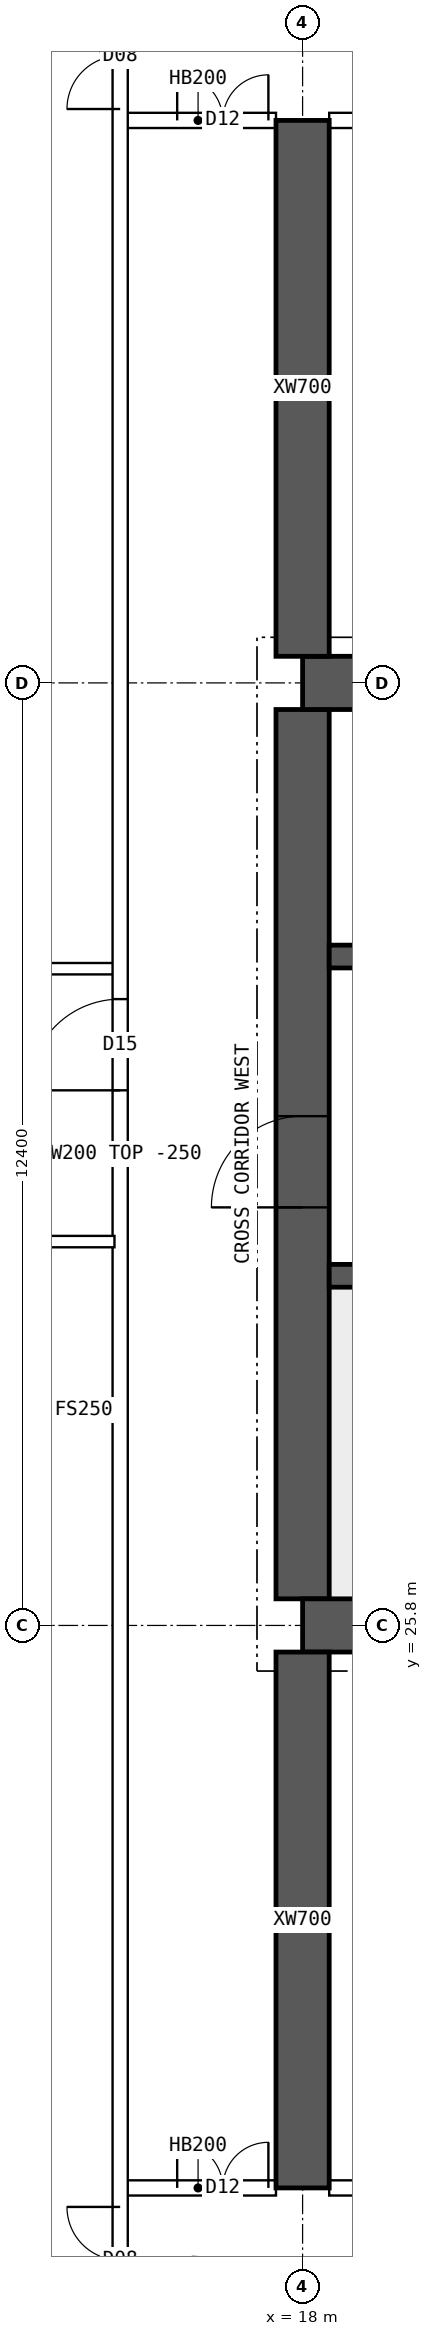
"""IFC4 building model, lengths in metres.
Left out: names, types, materials, properties, quantities, classifications, styles, units other than length and angle.
Written with IfcOpenShell. Run it as: python <this file> out.ifc"""

import sys

from ifc_helpers import new_model, si_unit, direction, frame, frame_2d, origin, place, context, subcontext, project, spatial, polyline, rectangle, outline, extrude, element, fill, save


model = new_model("IFC4")
c1 = context("Model", 3, precision=1e-05, world=origin(), true_north=direction((0.0, 1.0)))
c2 = subcontext(c1, "Body", "Model", "MODEL_VIEW")
j1 = project(units=[si_unit("LENGTHUNIT", "METRE"), si_unit("PLANEANGLEUNIT", "RADIAN")], contexts=[c1])
p1 = place(None, origin())
s1 = spatial("IfcSite", under=j1, at=p1, CompositionType="ELEMENT")
p2 = place(p1, origin())
s2 = spatial("IfcBuilding", under=s1, at=p2, CompositionType="ELEMENT")
p3 = place(p2, frame((0.0, 0.0, 239.05)))
s3 = spatial("IfcBuildingStorey", under=s2, at=p3, CompositionType="ELEMENT", Elevation=239.05)
for number, where, z_axis, x_axis in (
    (1, (18.0, 25.8, 0.0), (0.0, 0.0, 1.0), (1.0, 0.0, 0.0)),
    (2, (18.0, 38.2, 0.0), (0.0, 0.0, 1.0), (1.0, 0.0, 0.0)),
):
    element("IfcWall", number, at=place(p3, frame(where, z_axis=z_axis, x_axis=x_axis)), inside=s3, PredefinedType="SHEAR", context=c2, shape_type="SweptSolid", body=[
        extrude(rectangle(XDim=48.0, YDim=0.7, at=frame_2d((24.0, 0.0))), origin(), (0.0, 0.0, 1.0), 3.75),
    ])
p4 = place(p3, frame((18.0, 26.15, 0.0), z_axis=(0.0, 0.0, 1.0), x_axis=(0.0, 1.0, 0.0)))
e3 = element("IfcWall", 3, at=p4, inside=s3, PredefinedType="SHEAR", context=c2, shape_type="SweptSolid", body=[
    extrude(rectangle(XDim=11.7, YDim=0.7, at=frame_2d((5.85, 0.0))), origin(), (0.0, 0.0, 1.0), 3.75),
])
p5 = place(p4, frame((5.15, 0.0, 0.0)))
e4 = element("IfcOpeningElement", 4, at=p5, cuts=e3, PredefinedType="OPENING", context=c2, shape_type="SweptSolid", body=[
    extrude(rectangle(XDim=1.2, YDim=2.1, at=frame_2d((0.6, 1.05))), frame((0.0, 0.36, 0.0), z_axis=(0.0, -1.0, 0.0), x_axis=(1.0, 0.0, 0.0)), (0.0, 0.0, 1.0), 0.72),
])
p6 = place(p3, frame((18.35, 30.4, 0.0), z_axis=(0.0, 0.0, 1.0), x_axis=(1.0, 0.0, 0.0)))
e5 = element("IfcWall", 5, at=p6, inside=s3, PredefinedType="SHEAR", context=c2, shape_type="SweptSolid", body=[
    extrude(rectangle(XDim=47.3, YDim=0.3, at=frame_2d((23.65, 0.0))), origin(), (0.0, 0.0, 1.0), 3.75),
])
p7 = place(p6, frame((0.4, 0.0, 0.0)))
e6 = element("IfcOpeningElement", 6, at=p7, cuts=e5, PredefinedType="OPENING", context=c2, shape_type="SweptSolid", body=[
    extrude(rectangle(XDim=1.0, YDim=2.1, at=frame_2d((0.5, 1.05))), frame((0.0, 0.16, 0.0), z_axis=(0.0, -1.0, 0.0), x_axis=(1.0, 0.0, 0.0)), (0.0, 0.0, 1.0), 0.32),
])
p8 = place(p6, frame((45.9, 0.0, 0.0)))
e7 = element("IfcOpeningElement", 7, at=p8, cuts=e5, PredefinedType="OPENING", context=c2, shape_type="SweptSolid", body=[
    extrude(rectangle(XDim=1.0, YDim=2.1, at=frame_2d((0.5, 1.05))), frame((0.0, 0.16, 0.0), z_axis=(0.0, -1.0, 0.0), x_axis=(1.0, 0.0, 0.0)), (0.0, 0.0, 1.0), 0.32),
])
p9 = place(p6, frame((8.4, 0.0, 0.0)))
e8 = element("IfcOpeningElement", 8, at=p9, cuts=e5, PredefinedType="OPENING", context=c2, shape_type="SweptSolid", body=[
    extrude(rectangle(XDim=1.1, YDim=2.1, at=frame_2d((0.55, 1.05))), frame((0.0, 0.16, 0.0), z_axis=(0.0, -1.0, 0.0), x_axis=(1.0, 0.0, 0.0)), (0.0, 0.0, 1.0), 0.32),
])
p10 = place(p6, frame((11.0, 0.0, 0.0)))
e9 = element("IfcOpeningElement", 9, at=p10, cuts=e5, PredefinedType="OPENING", context=c2, shape_type="SweptSolid", body=[
    extrude(rectangle(XDim=1.1, YDim=2.1, at=frame_2d((0.55, 1.05))), frame((0.0, 0.16, 0.0), z_axis=(0.0, -1.0, 0.0), x_axis=(1.0, 0.0, 0.0)), (0.0, 0.0, 1.0), 0.32),
])
p11 = place(p6, frame((13.6, 0.0, 0.0)))
e10 = element("IfcOpeningElement", 10, at=p11, cuts=e5, PredefinedType="OPENING", context=c2, shape_type="SweptSolid", body=[
    extrude(rectangle(XDim=1.1, YDim=2.1, at=frame_2d((0.55, 1.05))), frame((0.0, 0.16, 0.0), z_axis=(0.0, -1.0, 0.0), x_axis=(1.0, 0.0, 0.0)), (0.0, 0.0, 1.0), 0.32),
])
p12 = place(p6, frame((16.2, 0.0, 0.0)))
e11 = element("IfcOpeningElement", 11, at=p12, cuts=e5, PredefinedType="OPENING", context=c2, shape_type="SweptSolid", body=[
    extrude(rectangle(XDim=1.1, YDim=2.1, at=frame_2d((0.55, 1.05))), frame((0.0, 0.16, 0.0), z_axis=(0.0, -1.0, 0.0), x_axis=(1.0, 0.0, 0.0)), (0.0, 0.0, 1.0), 0.32),
])
p13 = place(p6, frame((18.975, 0.0, 0.0)))
e12 = element("IfcOpeningElement", 12, at=p13, cuts=e5, PredefinedType="OPENING", context=c2, shape_type="SweptSolid", body=[
    extrude(rectangle(XDim=0.9, YDim=2.1, at=frame_2d((0.45, 1.05))), frame((0.0, 0.16, 0.0), z_axis=(0.0, -1.0, 0.0), x_axis=(1.0, 0.0, 0.0)), (0.0, 0.0, 1.0), 0.32),
])
p14 = place(p6, frame((24.475, 0.0, 0.0)))
e13 = element("IfcOpeningElement", 13, at=p14, cuts=e5, PredefinedType="OPENING", context=c2, shape_type="SweptSolid", body=[
    extrude(rectangle(XDim=0.9, YDim=2.1, at=frame_2d((0.45, 1.05))), frame((0.0, 0.16, 0.0), z_axis=(0.0, -1.0, 0.0), x_axis=(1.0, 0.0, 0.0)), (0.0, 0.0, 1.0), 0.32),
])
p15 = place(p6, frame((30.267, 0.0, 0.0)))
e14 = element("IfcOpeningElement", 14, at=p15, cuts=e5, PredefinedType="OPENING", context=c2, shape_type="SweptSolid", body=[
    extrude(rectangle(XDim=1.1, YDim=2.1, at=frame_2d((0.55, 1.05))), frame((0.0, 0.16, 0.0), z_axis=(0.0, -1.0, 0.0), x_axis=(1.0, 0.0, 0.0)), (0.0, 0.0, 1.0), 0.32),
])
p16 = place(p6, frame((33.8, 0.0, 0.0)))
e15 = element("IfcOpeningElement", 15, at=p16, cuts=e5, PredefinedType="OPENING", context=c2, shape_type="SweptSolid", body=[
    extrude(rectangle(XDim=1.1, YDim=2.1, at=frame_2d((0.55, 1.05))), frame((0.0, 0.16, 0.0), z_axis=(0.0, -1.0, 0.0), x_axis=(1.0, 0.0, 0.0)), (0.0, 0.0, 1.0), 0.32),
])
p17 = place(p6, frame((37.333, 0.0, 0.0)))
e16 = element("IfcOpeningElement", 16, at=p17, cuts=e5, PredefinedType="OPENING", context=c2, shape_type="SweptSolid", body=[
    extrude(rectangle(XDim=1.1, YDim=2.1, at=frame_2d((0.55, 1.05))), frame((0.0, 0.16, 0.0), z_axis=(0.0, -1.0, 0.0), x_axis=(1.0, 0.0, 0.0)), (0.0, 0.0, 1.0), 0.32),
])
p18 = place(p3, frame((18.35, 34.6, 0.0), z_axis=(0.0, 0.0, 1.0), x_axis=(1.0, 0.0, 0.0)))
e17 = element("IfcWall", 17, at=p18, inside=s3, PredefinedType="SHEAR", context=c2, shape_type="SweptSolid", body=[
    extrude(rectangle(XDim=47.3, YDim=0.3, at=frame_2d((23.65, 0.0))), origin(), (0.0, 0.0, 1.0), 3.75),
])
p19 = place(p18, frame((0.9, 0.0, 0.0)))
e18 = element("IfcOpeningElement", 18, at=p19, cuts=e17, PredefinedType="OPENING", context=c2, shape_type="SweptSolid", body=[
    extrude(rectangle(XDim=1.1, YDim=2.1, at=frame_2d((0.55, 1.05))), frame((0.0, 0.16, 0.0), z_axis=(0.0, -1.0, 0.0), x_axis=(1.0, 0.0, 0.0)), (0.0, 0.0, 1.0), 0.32),
])
p20 = place(p18, frame((45.3, 0.0, 0.0)))
e19 = element("IfcOpeningElement", 19, at=p20, cuts=e17, PredefinedType="OPENING", context=c2, shape_type="SweptSolid", body=[
    extrude(rectangle(XDim=1.1, YDim=2.1, at=frame_2d((0.55, 1.05))), frame((0.0, 0.16, 0.0), z_axis=(0.0, -1.0, 0.0), x_axis=(1.0, 0.0, 0.0)), (0.0, 0.0, 1.0), 0.32),
])
p21 = place(p18, frame((4.25, 0.0, 0.0)))
e20 = element("IfcOpeningElement", 20, at=p21, cuts=e17, PredefinedType="OPENING", context=c2, shape_type="SweptSolid", body=[
    extrude(rectangle(XDim=0.9, YDim=2.1, at=frame_2d((0.45, 1.05))), frame((0.0, 0.16, 0.0), z_axis=(0.0, -1.0, 0.0), x_axis=(1.0, 0.0, 0.0)), (0.0, 0.0, 1.0), 0.32),
])
p22 = place(p18, frame((42.15, 0.0, 0.0)))
e21 = element("IfcOpeningElement", 21, at=p22, cuts=e17, PredefinedType="OPENING", context=c2, shape_type="SweptSolid", body=[
    extrude(rectangle(XDim=0.9, YDim=2.1, at=frame_2d((0.45, 1.05))), frame((0.0, 0.16, 0.0), z_axis=(0.0, -1.0, 0.0), x_axis=(1.0, 0.0, 0.0)), (0.0, 0.0, 1.0), 0.32),
])
p23 = place(p18, frame((9.025, 0.0, 0.0)))
e22 = element("IfcOpeningElement", 22, at=p23, cuts=e17, PredefinedType="OPENING", context=c2, shape_type="SweptSolid", body=[
    extrude(rectangle(XDim=0.9, YDim=2.1, at=frame_2d((0.45, 1.05))), frame((0.0, 0.16, 0.0), z_axis=(0.0, -1.0, 0.0), x_axis=(1.0, 0.0, 0.0)), (0.0, 0.0, 1.0), 0.32),
])
p24 = place(p18, frame((12.999, 0.0, 0.0)))
e23 = element("IfcOpeningElement", 23, at=p24, cuts=e17, PredefinedType="OPENING", context=c2, shape_type="SweptSolid", body=[
    extrude(rectangle(XDim=0.9, YDim=2.1, at=frame_2d((0.45, 1.05))), frame((0.0, 0.16, 0.0), z_axis=(0.0, -1.0, 0.0), x_axis=(1.0, 0.0, 0.0)), (0.0, 0.0, 1.0), 0.32),
])
p25 = place(p18, frame((16.646, 0.0, 0.0)))
e24 = element("IfcOpeningElement", 24, at=p25, cuts=e17, PredefinedType="OPENING", context=c2, shape_type="SweptSolid", body=[
    extrude(rectangle(XDim=0.9, YDim=2.1, at=frame_2d((0.45, 1.05))), frame((0.0, 0.16, 0.0), z_axis=(0.0, -1.0, 0.0), x_axis=(1.0, 0.0, 0.0)), (0.0, 0.0, 1.0), 0.32),
])
p26 = place(p18, frame((20.405, 0.0, 0.0)))
e25 = element("IfcOpeningElement", 25, at=p26, cuts=e17, PredefinedType="OPENING", context=c2, shape_type="SweptSolid", body=[
    extrude(rectangle(XDim=0.9, YDim=2.1, at=frame_2d((0.45, 1.05))), frame((0.0, 0.16, 0.0), z_axis=(0.0, -1.0, 0.0), x_axis=(1.0, 0.0, 0.0)), (0.0, 0.0, 1.0), 0.32),
])
p27 = place(p18, frame((24.811, 0.0, 0.0)))
e26 = element("IfcOpeningElement", 26, at=p27, cuts=e17, PredefinedType="OPENING", context=c2, shape_type="SweptSolid", body=[
    extrude(rectangle(XDim=0.9, YDim=2.1, at=frame_2d((0.45, 1.05))), frame((0.0, 0.16, 0.0), z_axis=(0.0, -1.0, 0.0), x_axis=(1.0, 0.0, 0.0)), (0.0, 0.0, 1.0), 0.32),
])
p28 = place(p18, frame((27.608, 0.0, 0.0)))
e27 = element("IfcOpeningElement", 27, at=p28, cuts=e17, PredefinedType="OPENING", context=c2, shape_type="SweptSolid", body=[
    extrude(rectangle(XDim=0.9, YDim=2.1, at=frame_2d((0.45, 1.05))), frame((0.0, 0.16, 0.0), z_axis=(0.0, -1.0, 0.0), x_axis=(1.0, 0.0, 0.0)), (0.0, 0.0, 1.0), 0.32),
])
p29 = place(p18, frame((30.791, 0.0, 0.0)))
e28 = element("IfcOpeningElement", 28, at=p29, cuts=e17, PredefinedType="OPENING", context=c2, shape_type="SweptSolid", body=[
    extrude(rectangle(XDim=0.9, YDim=2.1, at=frame_2d((0.45, 1.05))), frame((0.0, 0.16, 0.0), z_axis=(0.0, -1.0, 0.0), x_axis=(1.0, 0.0, 0.0)), (0.0, 0.0, 1.0), 0.32),
])
p30 = place(p18, frame((34.742, 0.0, 0.0)))
e29 = element("IfcOpeningElement", 29, at=p30, cuts=e17, PredefinedType="OPENING", context=c2, shape_type="SweptSolid", body=[
    extrude(rectangle(XDim=0.9, YDim=2.1, at=frame_2d((0.45, 1.05))), frame((0.0, 0.16, 0.0), z_axis=(0.0, -1.0, 0.0), x_axis=(1.0, 0.0, 0.0)), (0.0, 0.0, 1.0), 0.32),
])
p31 = place(p18, frame((37.68, 0.0, 0.0)))
e30 = element("IfcOpeningElement", 30, at=p31, cuts=e17, PredefinedType="OPENING", context=c2, shape_type="SweptSolid", body=[
    extrude(rectangle(XDim=0.9, YDim=2.1, at=frame_2d((0.45, 1.05))), frame((0.0, 0.16, 0.0), z_axis=(0.0, -1.0, 0.0), x_axis=(1.0, 0.0, 0.0)), (0.0, 0.0, 1.0), 0.32),
])
for number, where, z_axis, x_axis in (
    (31, (18.0, 18.4, 0.0), (0.0, 0.0, 1.0), (0.0, 1.0, 0.0)),
    (32, (18.0, 38.55, 0.0), (0.0, 0.0, 1.0), (0.0, 1.0, 0.0)),
):
    element("IfcWall", number, at=place(p3, frame(where, z_axis=z_axis, x_axis=x_axis)), inside=s3, PredefinedType="SHEAR", context=c2, shape_type="SweptSolid", body=[
        extrude(rectangle(XDim=7.05, YDim=0.7, at=frame_2d((3.525, 0.0))), origin(), (0.0, 0.0, 1.0), 3.75),
    ])
p32 = place(p3, frame((15.6, 18.4, 0.0), z_axis=(0.0, 0.0, 1.0), x_axis=(1.0, 0.0, 0.0)))
e33 = element("IfcWall", 33, at=p32, inside=s3, PredefinedType="SOLIDWALL", context=c2, shape_type="SweptSolid", body=[
    extrude(rectangle(XDim=2.05, YDim=0.2, at=frame_2d((1.025, 0.0))), origin(), (0.0, 0.0, 1.0), 3.5),
])
p33 = place(p32, frame((0.75, 0.0, 0.0)))
e34 = element("IfcOpeningElement", 34, at=p33, cuts=e33, PredefinedType="OPENING", context=c2, shape_type="SweptSolid", body=[
    extrude(rectangle(XDim=1.2, YDim=2.1, at=frame_2d((0.6, 1.05))), frame((0.0, 0.11, 0.0), z_axis=(0.0, -1.0, 0.0), x_axis=(1.0, 0.0, 0.0)), (0.0, 0.0, 1.0), 0.22),
])
p34 = place(p3, frame((18.35, 18.4, 0.0), z_axis=(0.0, 0.0, 1.0), x_axis=(1.0, 0.0, 0.0)))
e35 = element("IfcWall", 35, at=p34, inside=s3, PredefinedType="SOLIDWALL", context=c2, shape_type="SweptSolid", body=[
    extrude(rectangle(XDim=5.3, YDim=0.2, at=frame_2d((2.65, 0.0))), origin(), (0.0, 0.0, 1.0), 3.5),
])
p35 = place(p34, frame((0.35, 0.0, 0.0)))
e36 = element("IfcOpeningElement", 36, at=p35, cuts=e35, PredefinedType="OPENING", context=c2, shape_type="SweptSolid", body=[
    extrude(rectangle(XDim=0.9, YDim=2.1, at=frame_2d((0.45, 1.05))), frame((0.0, 0.11, 0.0), z_axis=(0.0, -1.0, 0.0), x_axis=(1.0, 0.0, 0.0)), (0.0, 0.0, 1.0), 0.22),
])
p36 = place(p34, frame((2.725, 0.0, 0.0)))
e37 = element("IfcOpeningElement", 37, at=p36, cuts=e35, PredefinedType="OPENING", context=c2, shape_type="SweptSolid", body=[
    extrude(rectangle(XDim=0.9, YDim=2.1, at=frame_2d((0.45, 1.05))), frame((0.0, 0.11, 0.0), z_axis=(0.0, -1.0, 0.0), x_axis=(1.0, 0.0, 0.0)), (0.0, 0.0, 1.0), 0.22),
])
p37 = place(p3, frame((15.6, 45.6, 0.0), z_axis=(0.0, 0.0, 1.0), x_axis=(1.0, 0.0, 0.0)))
e38 = element("IfcWall", 38, at=p37, inside=s3, PredefinedType="SOLIDWALL", context=c2, shape_type="SweptSolid", body=[
    extrude(rectangle(XDim=2.05, YDim=0.2, at=frame_2d((1.025, 0.0))), origin(), (0.0, 0.0, 1.0), 3.5),
])
p38 = place(p37, frame((0.75, 0.0, 0.0)))
e39 = element("IfcOpeningElement", 39, at=p38, cuts=e38, PredefinedType="OPENING", context=c2, shape_type="SweptSolid", body=[
    extrude(rectangle(XDim=1.2, YDim=2.1, at=frame_2d((0.6, 1.05))), frame((0.0, 0.11, 0.0), z_axis=(0.0, -1.0, 0.0), x_axis=(1.0, 0.0, 0.0)), (0.0, 0.0, 1.0), 0.22),
])
p39 = place(p3, frame((18.35, 45.6, 0.0), z_axis=(0.0, 0.0, 1.0), x_axis=(1.0, 0.0, 0.0)))
e40 = element("IfcWall", 40, at=p39, inside=s3, PredefinedType="SOLIDWALL", context=c2, shape_type="SweptSolid", body=[
    extrude(rectangle(XDim=5.3, YDim=0.2, at=frame_2d((2.65, 0.0))), origin(), (0.0, 0.0, 1.0), 3.5),
])
p40 = place(p39, frame((0.8, 0.0, 0.0)))
e41 = element("IfcOpeningElement", 41, at=p40, cuts=e40, PredefinedType="OPENING", context=c2, shape_type="SweptSolid", body=[
    extrude(rectangle(XDim=1.0, YDim=2.1, at=frame_2d((0.5, 1.05))), frame((0.0, 0.11, 0.0), z_axis=(0.0, -1.0, 0.0), x_axis=(1.0, 0.0, 0.0)), (0.0, 0.0, 1.0), 0.22),
])
p41 = place(p3, frame((8.705, 30.85, 0.0), z_axis=(0.0, 0.0, 1.0), x_axis=(1.0, 0.0, 0.0)))
e42 = element("IfcWall", 42, at=p41, inside=s3, PredefinedType="PARTITIONING", context=c2, shape_type="SweptSolid", body=[
    extrude(outline(polyline([(0.0, 0.0), (6.82, 0.0), (6.82, 3.5), (3.597, 3.5), (3.595, 3.05), (2.997, 3.05), (2.995, 3.5), (0.0, 3.5), (0.0, 0.0)])), frame((0.0, 0.075, 0.0), z_axis=(0.0, -1.0, 0.0), x_axis=(1.0, 0.0, 0.0)), (0.0, 0.0, 1.0), 0.15),
])
p42 = place(p3, frame((15.6, 11.646, 0.0), z_axis=(0.0, 0.0, 1.0), x_axis=(0.0, 1.0, 0.0)))
e43 = element("IfcWall", 43, at=p42, inside=s3, PredefinedType="SOLIDWALL", context=c2, shape_type="SweptSolid", body=[
    extrude(rectangle(XDim=40.708, YDim=0.2, at=frame_2d((20.354, 0.0))), origin(), (0.0, 0.0, 1.0), 3.5),
])
p43 = place(p42, frame((21.194, 0.0, 0.0)))
e44 = element("IfcOpeningElement", 44, at=p43, cuts=e43, PredefinedType="OPENING", context=c2, shape_type="SweptSolid", body=[
    extrude(rectangle(XDim=1.2, YDim=2.1, at=frame_2d((0.6, 1.05))), frame((0.0, 0.11, 0.0), z_axis=(0.0, -1.0, 0.0), x_axis=(1.0, 0.0, 0.0)), (0.0, 0.0, 1.0), 0.22),
])
p44 = place(p42, frame((5.104, 0.0, 0.0)))
e45 = element("IfcOpeningElement", 45, at=p44, cuts=e43, PredefinedType="OPENING", context=c2, shape_type="SweptSolid", body=[
    extrude(rectangle(XDim=1.4, YDim=2.1, at=frame_2d((0.7, 1.05))), frame((0.0, 0.11, 0.0), z_axis=(0.0, -1.0, 0.0), x_axis=(1.0, 0.0, 0.0)), (0.0, 0.0, 1.0), 0.22),
])
p45 = place(p42, frame((34.104, 0.0, 0.0)))
e46 = element("IfcOpeningElement", 46, at=p45, cuts=e43, PredefinedType="OPENING", context=c2, shape_type="SweptSolid", body=[
    extrude(rectangle(XDim=1.4, YDim=2.1, at=frame_2d((0.7, 1.05))), frame((0.0, 0.11, 0.0), z_axis=(0.0, -1.0, 0.0), x_axis=(1.0, 0.0, 0.0)), (0.0, 0.0, 1.0), 0.22),
])
p46 = place(p3, frame((8.705, 34.44, 0.0), z_axis=(0.0, 0.0, 1.0), x_axis=(1.0, 0.0, 0.0)))
e47 = element("IfcWall", 47, at=p46, inside=s3, PredefinedType="PARTITIONING", context=c2, shape_type="SweptSolid", body=[
    extrude(outline(polyline([(0.0, 0.0), (6.82, 0.0), (6.82, 3.5), (3.597, 3.5), (3.595, 3.05), (2.997, 3.05), (2.995, 3.5), (0.0, 3.5), (0.0, 0.0)])), frame((0.0, 0.075, 0.0), z_axis=(0.0, -1.0, 0.0), x_axis=(1.0, 0.0, 0.0)), (0.0, 0.0, 1.0), 0.15),
])
p47 = place(p5, origin())
e48 = element("IfcDoor", 48, at=p47, inside=s3, OperationType="SINGLE_SWING_LEFT", PredefinedType="DOOR", context=c2, shape_type="SweptSolid", body=[
    extrude(rectangle(XDim=1.2, YDim=2.1, at=frame_2d((0.6, 1.05))), frame((0.0, 0.025, 0.0), z_axis=(0.0, -1.0, 0.0), x_axis=(1.0, 0.0, 0.0)), (0.0, 0.0, 1.0), 0.05),
])
fill(e4, e48)
p48 = place(p33, origin())
e49 = element("IfcDoor", 49, at=p48, inside=s3, OperationType="DOUBLE_DOOR_SINGLE_SWING", PredefinedType="DOOR", context=c2, shape_type="SweptSolid", body=[
    extrude(rectangle(XDim=1.2, YDim=2.1, at=frame_2d((0.6, 1.05))), frame((0.0, 0.025, 0.0), z_axis=(0.0, -1.0, 0.0), x_axis=(1.0, 0.0, 0.0)), (0.0, 0.0, 1.0), 0.05),
])
fill(e34, e49)
p49 = place(p38, origin())
e50 = element("IfcDoor", 50, at=p49, inside=s3, OperationType="DOUBLE_DOOR_SINGLE_SWING", PredefinedType="DOOR", context=c2, shape_type="SweptSolid", body=[
    extrude(rectangle(XDim=1.2, YDim=2.1, at=frame_2d((0.6, 1.05))), frame((0.0, 0.025, 0.0), z_axis=(0.0, -1.0, 0.0), x_axis=(1.0, 0.0, 0.0)), (0.0, 0.0, 1.0), 0.05),
])
fill(e39, e50)
p50 = place(p43, origin())
e51 = element("IfcDoor", 51, at=p50, inside=s3, OperationType="SINGLE_SWING_LEFT", PredefinedType="DOOR", context=c2, shape_type="SweptSolid", body=[
    extrude(rectangle(XDim=1.2, YDim=2.1, at=frame_2d((0.6, 1.05))), frame((0.0, 0.025, 0.0), z_axis=(0.0, -1.0, 0.0), x_axis=(1.0, 0.0, 0.0)), (0.0, 0.0, 1.0), 0.05),
])
fill(e44, e51)
p51 = place(p44, origin())
e52 = element("IfcDoor", 52, at=p51, inside=s3, OperationType="DOUBLE_DOOR_SINGLE_SWING", PredefinedType="DOOR", context=c2, shape_type="SweptSolid", body=[
    extrude(rectangle(XDim=1.4, YDim=2.1, at=frame_2d((0.7, 1.05))), frame((0.0, 0.025, 0.0), z_axis=(0.0, -1.0, 0.0), x_axis=(1.0, 0.0, 0.0)), (0.0, 0.0, 1.0), 0.05),
])
fill(e45, e52)
p52 = place(p45, origin())
e53 = element("IfcDoor", 53, at=p52, inside=s3, OperationType="DOUBLE_DOOR_SINGLE_SWING", PredefinedType="DOOR", context=c2, shape_type="SweptSolid", body=[
    extrude(rectangle(XDim=1.4, YDim=2.1, at=frame_2d((0.7, 1.05))), frame((0.0, 0.025, 0.0), z_axis=(0.0, -1.0, 0.0), x_axis=(1.0, 0.0, 0.0)), (0.0, 0.0, 1.0), 0.05),
])
fill(e46, e53)
save(model, sys.argv[1])
